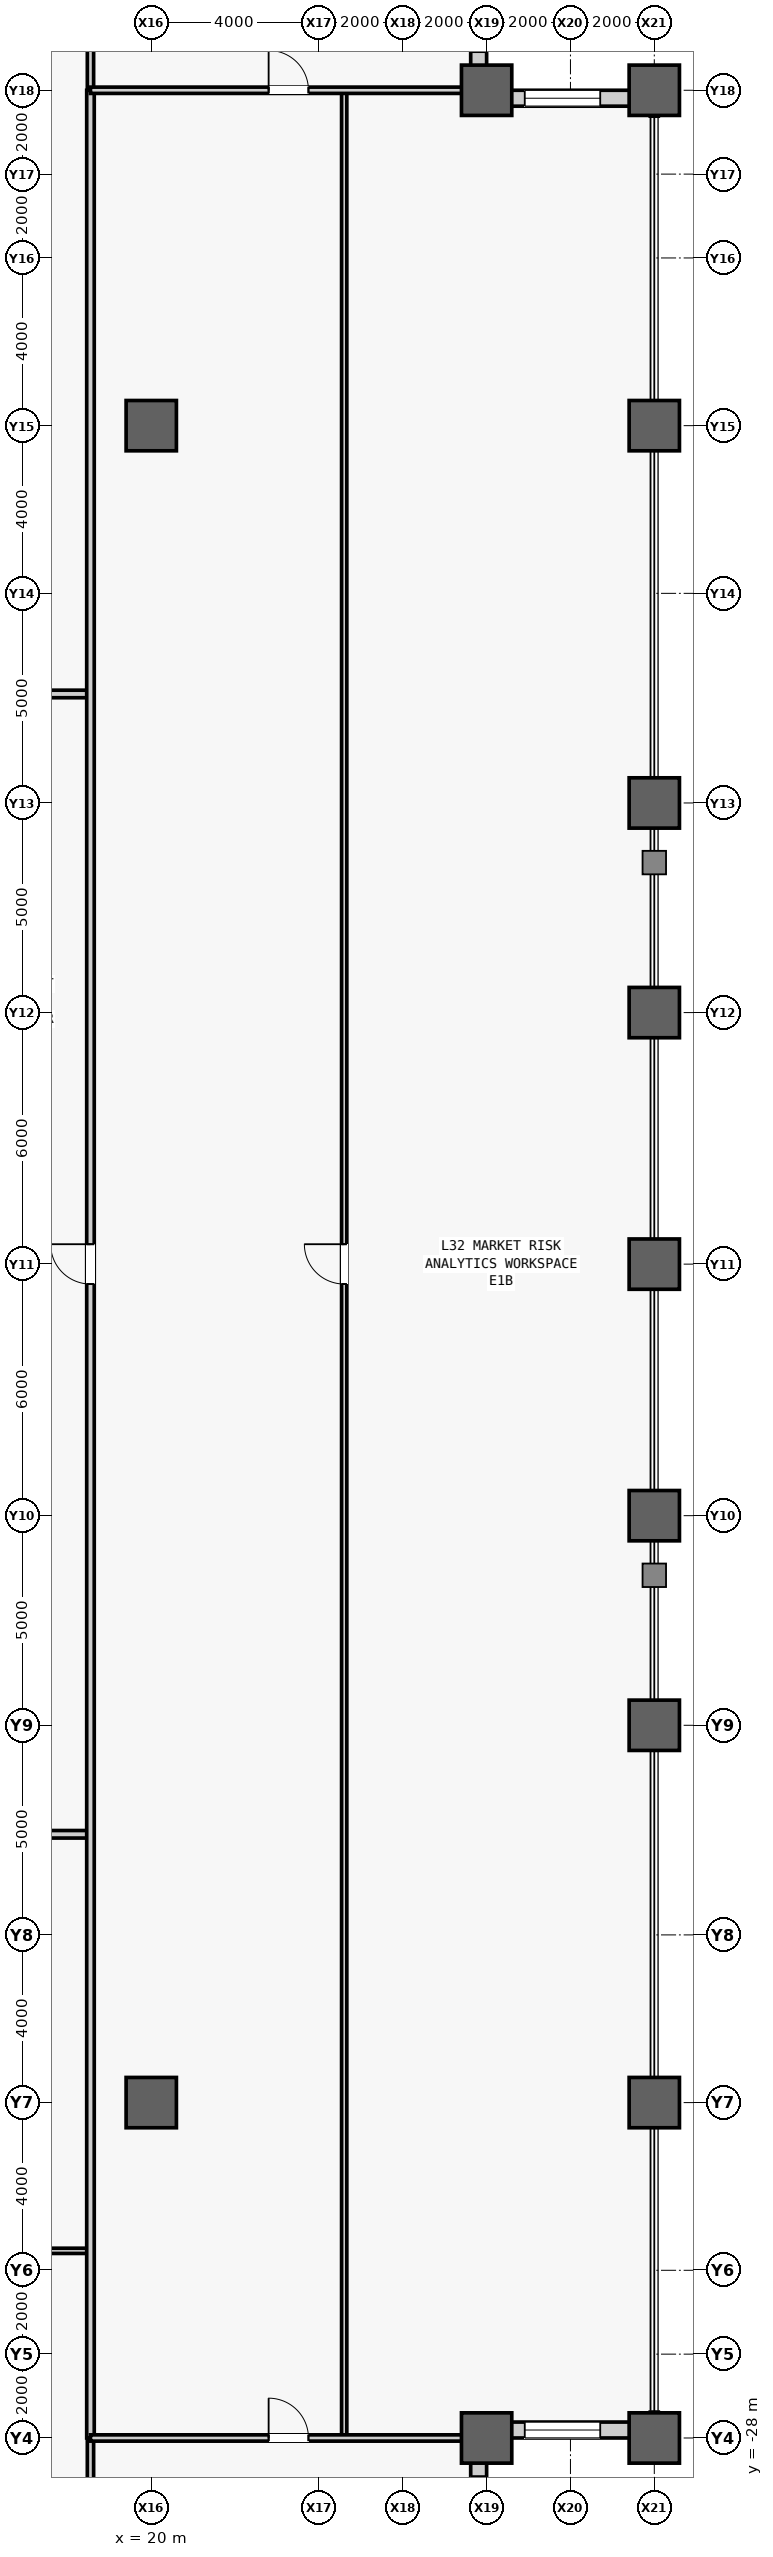
"""IFC4 building model, lengths in metres.
Left out: names, types, materials, properties, quantities, classifications, styles, units other than length and angle.
Written with IfcOpenShell. Run it as: python <this file> out.ifc"""

import sys

from ifc_helpers import new_model, si_unit, direction, frame, frame_2d, origin, origin_2d, place, context, subcontext, project, spatial, rectangle, hollow_rectangle, extrude, source, transform, mapped, element, fill, save


model = new_model("IFC4")
c1 = context("Model", 3, precision=1e-05, world=origin(), true_north=direction((0.0, 1.0)))
c2 = subcontext(c1, "Body", "Model", "MODEL_VIEW")
j1 = project(units=[si_unit("LENGTHUNIT", "METRE"), si_unit("PLANEANGLEUNIT", "RADIAN")], contexts=[c1])
p1 = place(None, origin())
s1 = spatial("IfcSite", under=j1, at=p1, CompositionType="ELEMENT")
p2 = place(p1, origin())
s2 = spatial("IfcBuilding", under=s1, at=p2, CompositionType="ELEMENT")
p3 = place(p2, frame((0.0, 0.0, 140.6)))
s3 = spatial("IfcBuildingStorey", under=s2, at=p3, CompositionType="ELEMENT", Elevation=140.6)
m1 = source(origin(), c2, "Body", "SweptSolid", [
    extrude(hollow_rectangle(XDim=1.2, YDim=1.2, WallThickness=0.07, at=origin_2d()), origin(), (0.0, 0.0, 1.0), 4.1),
])
for number, where, z_axis, x_axis in (
    (1, (20.0, -20.0, 0.0), (0.0, 0.0, 1.0), (1.0, 0.0, 0.0)),
    (2, (20.0, 20.0, 0.0), (0.0, 0.0, 1.0), (1.0, 0.0, 0.0)),
    (3, (28.0, -28.0, 0.0), (0.0, 0.0, 1.0), (1.0, 0.0, 0.0)),
    (4, (28.0, 28.0, 0.0), (0.0, 0.0, 1.0), (1.0, 0.0, 0.0)),
    (5, (32.0, -28.0, 0.0), (0.0, 0.0, 1.0), (1.0, 0.0, 0.0)),
    (6, (32.0, -20.0, 0.0), (0.0, 0.0, 1.0), (1.0, 0.0, 0.0)),
    (7, (32.0, -11.0, 0.0), (0.0, 0.0, 1.0), (1.0, 0.0, 0.0)),
    (8, (32.0, -6.0, 0.0), (0.0, 0.0, 1.0), (1.0, 0.0, 0.0)),
    (9, (32.0, 0.0, 0.0), (0.0, 0.0, 1.0), (1.0, 0.0, 0.0)),
    (10, (32.0, 6.0, 0.0), (0.0, 0.0, 1.0), (1.0, 0.0, 0.0)),
    (11, (32.0, 11.0, 0.0), (0.0, 0.0, 1.0), (1.0, 0.0, 0.0)),
    (12, (32.0, 20.0, 0.0), (0.0, 0.0, 1.0), (1.0, 0.0, 0.0)),
    (13, (32.0, 28.0, 0.0), (0.0, 0.0, 1.0), (1.0, 0.0, 0.0)),
):
    element("IfcColumn", number, at=place(p3, frame(where, z_axis=z_axis, x_axis=x_axis)), inside=s3, PredefinedType="COLUMN", context=c2, shape_type="MappedRepresentation", body=[
        mapped(m1, transform((0.0, 0.0, 0.0), scale=1.0)),
    ])
m2 = source(origin(), c2, "Body", "SweptSolid", [
    extrude(rectangle(XDim=3.62, YDim=0.38, at=frame_2d((1.81, 0.0))), origin(), (0.0, 0.0, 1.0), 3.145),
])
p4 = place(p3, frame((27.81, -31.62, 0.0), z_axis=(0.0, 0.0, 1.0), x_axis=(0.0, 1.0, 0.0)))
e14 = element("IfcWall", 14, at=p4, inside=s3, PredefinedType="STANDARD", context=c2, shape_type="MappedRepresentation", body=[
    mapped(m2, transform((0.0, 0.0, 0.0), scale=1.0)),
])
m3 = source(origin(), c2, "Body", "SweptSolid", [
    extrude(rectangle(XDim=1.8, YDim=2.4, at=frame_2d((0.9, 1.2))), frame((0.0, 0.2, 0.0), z_axis=(0.0, -1.0, 0.0), x_axis=(1.0, 0.0, 0.0)), (0.0, 0.0, 1.0), 0.4),
])
p5 = place(p4, frame((0.91, 0.0, 0.5)))
e15 = element("IfcOpeningElement", 15, at=p5, cuts=e14, PredefinedType="OPENING", context=c2, shape_type="MappedRepresentation", body=[
    mapped(m3, transform((0.0, 0.0, 0.0), scale=1.0)),
])
p6 = place(p3, frame((28.0, -27.81, 0.0), z_axis=(0.0, 0.0, 1.0), x_axis=(1.0, 0.0, 0.0)))
e16 = element("IfcWall", 16, at=p6, inside=s3, PredefinedType="STANDARD", context=c2, shape_type="MappedRepresentation", body=[
    mapped(m2, transform((0.0, 0.0, 0.0), scale=1.0)),
])
p7 = place(p6, frame((0.91, 0.0, 0.5)))
e17 = element("IfcOpeningElement", 17, at=p7, cuts=e16, PredefinedType="OPENING", context=c2, shape_type="MappedRepresentation", body=[
    mapped(m3, transform((0.0, 0.0, 0.0), scale=1.0)),
])
p8 = place(p3, frame((28.0, 27.81, 0.0), z_axis=(0.0, 0.0, 1.0), x_axis=(1.0, 0.0, 0.0)))
e18 = element("IfcWall", 18, at=p8, inside=s3, PredefinedType="STANDARD", context=c2, shape_type="MappedRepresentation", body=[
    mapped(m2, transform((0.0, 0.0, 0.0), scale=1.0)),
])
p9 = place(p8, frame((0.91, 0.0, 0.5)))
e19 = element("IfcOpeningElement", 19, at=p9, cuts=e18, PredefinedType="OPENING", context=c2, shape_type="MappedRepresentation", body=[
    mapped(m3, transform((0.0, 0.0, 0.0), scale=1.0)),
])
p10 = place(p3, frame((27.81, 28.0, 0.0), z_axis=(0.0, 0.0, 1.0), x_axis=(0.0, 1.0, 0.0)))
e20 = element("IfcWall", 20, at=p10, inside=s3, PredefinedType="STANDARD", context=c2, shape_type="MappedRepresentation", body=[
    mapped(m2, transform((0.0, 0.0, 0.0), scale=1.0)),
])
p11 = place(p10, frame((0.91, 0.0, 0.5)))
e21 = element("IfcOpeningElement", 21, at=p11, cuts=e20, PredefinedType="OPENING", context=c2, shape_type="MappedRepresentation", body=[
    mapped(m3, transform((0.0, 0.0, 0.0), scale=1.0)),
])
m4 = source(origin(), c2, "Body", "SweptSolid", [
    extrude(rectangle(XDim=20.3, YDim=0.125, at=frame_2d((10.15, 0.0))), origin(), (0.0, 0.0, 1.0), 3.84),
])
p12 = place(p3, frame((-1.75, -23.536, 0.0), z_axis=(0.0, 0.0, 1.0), x_axis=(1.0, 0.0, 0.0)))
e22 = element("IfcWall", 22, at=p12, inside=s3, PredefinedType="PARTITIONING", context=c2, shape_type="MappedRepresentation", body=[
    mapped(m4, transform((0.0, 0.0, 0.0), scale=1.0)),
])
m5 = source(origin(), c2, "Body", "SweptSolid", [
    extrude(rectangle(XDim=0.95, YDim=2.15, at=frame_2d((0.475, 1.075))), frame((0.0, 0.073, 0.0), z_axis=(0.0, -1.0, 0.0), x_axis=(1.0, 0.0, 0.0)), (0.0, 0.0, 1.0), 0.145),
])
p13 = place(p12, frame((9.675, 0.0, 0.0)))
e23 = element("IfcOpeningElement", 23, at=p13, cuts=e22, PredefinedType="OPENING", context=c2, shape_type="MappedRepresentation", body=[
    mapped(m5, transform((0.0, 0.0, 0.0), scale=1.0)),
])
m6 = source(origin(), c2, "Body", "SweptSolid", [
    extrude(rectangle(XDim=36.25, YDim=0.18, at=frame_2d((18.125, 0.0))), origin(), (0.0, 0.0, 1.0), 3.84),
])
p14 = place(p3, frame((-17.7, -13.6, 0.0), z_axis=(0.0, 0.0, 1.0), x_axis=(1.0, 0.0, 0.0)))
e24 = element("IfcWall", 24, at=p14, inside=s3, PredefinedType="PARTITIONING", context=c2, shape_type="MappedRepresentation", body=[
    mapped(m6, transform((0.0, 0.0, 0.0), scale=1.0)),
])
m7 = source(origin(), c2, "Body", "SweptSolid", [
    extrude(rectangle(XDim=1.05, YDim=2.2, at=frame_2d((0.525, 1.1))), frame((0.0, 0.1, 0.0), z_axis=(0.0, -1.0, 0.0), x_axis=(1.0, 0.0, 0.0)), (0.0, 0.0, 1.0), 0.2),
])
p15 = place(p14, frame((9.1, 0.0, 0.0)))
e25 = element("IfcOpeningElement", 25, at=p15, cuts=e24, PredefinedType="OPENING", context=c2, shape_type="MappedRepresentation", body=[
    mapped(m7, transform((0.0, 0.0, 0.0), scale=1.0)),
])
p16 = place(p14, frame((23.5, 0.0, 0.0)))
e26 = element("IfcOpeningElement", 26, at=p16, cuts=e24, PredefinedType="OPENING", context=c2, shape_type="MappedRepresentation", body=[
    mapped(m7, transform((0.0, 0.0, 0.0), scale=1.0)),
])
p17 = place(p3, frame((-17.7, 13.6, 0.0), z_axis=(0.0, 0.0, 1.0), x_axis=(1.0, 0.0, 0.0)))
e27 = element("IfcWall", 27, at=p17, inside=s3, PredefinedType="PARTITIONING", context=c2, shape_type="MappedRepresentation", body=[
    mapped(m6, transform((0.0, 0.0, 0.0), scale=1.0)),
])
p18 = place(p17, frame((4.387, 0.0, 0.0)))
e28 = element("IfcOpeningElement", 28, at=p18, cuts=e27, PredefinedType="OPENING", context=c2, shape_type="MappedRepresentation", body=[
    mapped(m7, transform((0.0, 0.0, 0.0), scale=1.0)),
])
p19 = place(p17, frame((9.625, 0.0, 0.0)))
e29 = element("IfcOpeningElement", 29, at=p19, cuts=e27, PredefinedType="OPENING", context=c2, shape_type="MappedRepresentation", body=[
    mapped(m7, transform((0.0, 0.0, 0.0), scale=1.0)),
])
p20 = place(p17, frame((17.6, 0.0, 0.0)))
e30 = element("IfcOpeningElement", 30, at=p20, cuts=e27, PredefinedType="OPENING", context=c2, shape_type="MappedRepresentation", body=[
    mapped(m7, transform((0.0, 0.0, 0.0), scale=1.0)),
])
p21 = place(p17, frame((25.938, 0.0, 0.0)))
e31 = element("IfcOpeningElement", 31, at=p21, cuts=e27, PredefinedType="OPENING", context=c2, shape_type="MappedRepresentation", body=[
    mapped(m7, transform((0.0, 0.0, 0.0), scale=1.0)),
])
p22 = place(p17, frame((30.75, 0.0, 0.0)))
e32 = element("IfcOpeningElement", 32, at=p22, cuts=e27, PredefinedType="OPENING", context=c2, shape_type="MappedRepresentation", body=[
    mapped(m7, transform((0.0, 0.0, 0.0), scale=1.0)),
])
m8 = source(origin(), c2, "Body", "SweptSolid", [
    extrude(rectangle(XDim=4.0, YDim=0.15, at=frame_2d((2.0, 0.0))), origin(), (0.0, 0.0, 1.0), 3.84),
])
for number, where, z_axis, x_axis in (
    (33, (18.55, -32.0, 0.0), (0.0, 0.0, 1.0), (0.0, 1.0, 0.0)),
    (34, (18.55, 28.0, 0.0), (0.0, 0.0, 1.0), (0.0, 1.0, 0.0)),
):
    element("IfcWall", number, at=place(p3, frame(where, z_axis=z_axis, x_axis=x_axis)), inside=s3, PredefinedType="PARTITIONING", context=c2, shape_type="MappedRepresentation", body=[
        mapped(m8, transform((0.0, 0.0, 0.0), scale=1.0)),
    ])
m9 = source(origin(), c2, "Body", "SweptSolid", [
    extrude(rectangle(XDim=56.0, YDim=0.125, at=frame_2d((28.0, 0.0))), origin(), (0.0, 0.0, 1.0), 3.84),
])
p23 = place(p3, frame((24.603, -28.0, 0.0), z_axis=(0.0, 0.0, 1.0), x_axis=(0.0, 1.0, 0.0)))
e35 = element("IfcWall", 35, at=p23, inside=s3, PredefinedType="PARTITIONING", context=c2, shape_type="MappedRepresentation", body=[
    mapped(m9, transform((0.0, 0.0, 0.0), scale=1.0)),
])
p24 = place(p23, frame((27.525, 0.0, 0.0)))
e36 = element("IfcOpeningElement", 36, at=p24, cuts=e35, PredefinedType="OPENING", context=c2, shape_type="MappedRepresentation", body=[
    mapped(m5, transform((0.0, 0.0, 0.0), scale=1.0)),
])
m10 = source(origin(), c2, "Body", "SweptSolid", [
    extrude(rectangle(XDim=56.0, YDim=0.18, at=frame_2d((28.0, 0.0))), origin(), (0.0, 0.0, 1.0), 3.84),
])
p25 = place(p3, frame((18.55, -28.0, 0.0), z_axis=(0.0, 0.0, 1.0), x_axis=(0.0, 1.0, 0.0)))
e37 = element("IfcWall", 37, at=p25, inside=s3, PredefinedType="PARTITIONING", context=c2, shape_type="MappedRepresentation", body=[
    mapped(m10, transform((0.0, 0.0, 0.0), scale=1.0)),
])
m11 = source(origin(), c2, "Body", "SweptSolid", [
    extrude(rectangle(XDim=0.95, YDim=2.15, at=frame_2d((0.475, 1.075))), frame((0.0, 0.1, 0.0), z_axis=(0.0, -1.0, 0.0), x_axis=(1.0, 0.0, 0.0)), (0.0, 0.0, 1.0), 0.2),
])
p26 = place(p25, frame((27.525, 0.0, 0.0)))
e38 = element("IfcOpeningElement", 38, at=p26, cuts=e37, PredefinedType="OPENING", context=c2, shape_type="MappedRepresentation", body=[
    mapped(m11, transform((0.0, 0.0, 0.0), scale=1.0)),
])
m12 = source(origin(), c2, "Body", "SweptSolid", [
    extrude(rectangle(XDim=9.45, YDim=0.15, at=frame_2d((4.725, 0.0))), origin(), (0.0, 0.0, 1.0), 3.84),
])
p27 = place(p3, frame((18.55, -28.0, 0.0), z_axis=(0.0, 0.0, 1.0), x_axis=(1.0, 0.0, 0.0)))
e39 = element("IfcWall", 39, at=p27, inside=s3, PredefinedType="PARTITIONING", context=c2, shape_type="MappedRepresentation", body=[
    mapped(m12, transform((0.0, 0.0, 0.0), scale=1.0)),
])
m13 = source(origin(), c2, "Body", "SweptSolid", [
    extrude(rectangle(XDim=0.95, YDim=2.15, at=frame_2d((0.475, 1.075))), frame((0.0, 0.085, 0.0), z_axis=(0.0, -1.0, 0.0), x_axis=(1.0, 0.0, 0.0)), (0.0, 0.0, 1.0), 0.17),
])
p28 = place(p27, frame((4.25, 0.0, 0.0)))
e40 = element("IfcOpeningElement", 40, at=p28, cuts=e39, PredefinedType="OPENING", context=c2, shape_type="MappedRepresentation", body=[
    mapped(m13, transform((0.0, 0.0, 0.0), scale=1.0)),
])
p29 = place(p3, frame((18.55, 28.0, 0.0), z_axis=(0.0, 0.0, 1.0), x_axis=(1.0, 0.0, 0.0)))
e41 = element("IfcWall", 41, at=p29, inside=s3, PredefinedType="PARTITIONING", context=c2, shape_type="MappedRepresentation", body=[
    mapped(m12, transform((0.0, 0.0, 0.0), scale=1.0)),
])
p30 = place(p29, frame((4.25, 0.0, 0.0)))
e42 = element("IfcOpeningElement", 42, at=p30, cuts=e41, PredefinedType="OPENING", context=c2, shape_type="MappedRepresentation", body=[
    mapped(m13, transform((0.0, 0.0, 0.0), scale=1.0)),
])
m14 = source(origin(), c2, "Body", "SweptSolid", [
    extrude(rectangle(XDim=1.8, YDim=2.4, at=frame_2d((0.9, 1.2))), frame((0.0, 0.03, 0.0), z_axis=(0.0, -1.0, 0.0), x_axis=(1.0, 0.0, 0.0)), (0.0, 0.0, 1.0), 0.06),
])
p31 = place(p5, origin())
e43 = element("IfcWindow", 43, at=p31, inside=s3, PartitioningType="SINGLE_PANEL", PredefinedType="WINDOW", context=c2, shape_type="MappedRepresentation", body=[
    mapped(m14, transform((0.0, 0.0, 0.0), scale=1.0)),
])
fill(e15, e43)
p32 = place(p7, origin())
e44 = element("IfcWindow", 44, at=p32, inside=s3, PartitioningType="SINGLE_PANEL", PredefinedType="WINDOW", context=c2, shape_type="MappedRepresentation", body=[
    mapped(m14, transform((0.0, 0.0, 0.0), scale=1.0)),
])
fill(e17, e44)
p33 = place(p9, origin())
e45 = element("IfcWindow", 45, at=p33, inside=s3, PartitioningType="SINGLE_PANEL", PredefinedType="WINDOW", context=c2, shape_type="MappedRepresentation", body=[
    mapped(m14, transform((0.0, 0.0, 0.0), scale=1.0)),
])
fill(e19, e45)
p34 = place(p11, origin())
e46 = element("IfcWindow", 46, at=p34, inside=s3, PartitioningType="SINGLE_PANEL", PredefinedType="WINDOW", context=c2, shape_type="MappedRepresentation", body=[
    mapped(m14, transform((0.0, 0.0, 0.0), scale=1.0)),
])
fill(e21, e46)
m15 = source(origin(), c2, "Body", "SweptSolid", [
    extrude(rectangle(XDim=0.95, YDim=2.15, at=frame_2d((0.475, 1.075))), frame((0.0, 0.025, 0.0), z_axis=(0.0, -1.0, 0.0), x_axis=(1.0, 0.0, 0.0)), (0.0, 0.0, 1.0), 0.05),
])
p35 = place(p24, origin())
e47 = element("IfcDoor", 47, at=p35, inside=s3, OperationType="SINGLE_SWING_RIGHT", PredefinedType="DOOR", context=c2, shape_type="MappedRepresentation", body=[
    mapped(m15, transform((0.0, 0.0, 0.0), scale=1.0)),
])
fill(e36, e47)
p36 = place(p26, origin())
e48 = element("IfcDoor", 48, at=p36, inside=s3, OperationType="SINGLE_SWING_RIGHT", PredefinedType="DOOR", context=c2, shape_type="MappedRepresentation", body=[
    mapped(m15, transform((0.0, 0.0, 0.0), scale=1.0)),
])
fill(e38, e48)
p37 = place(p28, origin())
e49 = element("IfcDoor", 49, at=p37, inside=s3, OperationType="SINGLE_SWING_LEFT", PredefinedType="DOOR", context=c2, shape_type="MappedRepresentation", body=[
    mapped(m15, transform((0.0, 0.0, 0.0), scale=1.0)),
])
fill(e40, e49)
p38 = place(p30, origin())
e50 = element("IfcDoor", 50, at=p38, inside=s3, OperationType="SINGLE_SWING_LEFT", PredefinedType="DOOR", context=c2, shape_type="MappedRepresentation", body=[
    mapped(m15, transform((0.0, 0.0, 0.0), scale=1.0)),
])
fill(e42, e50)
save(model, sys.argv[1])
